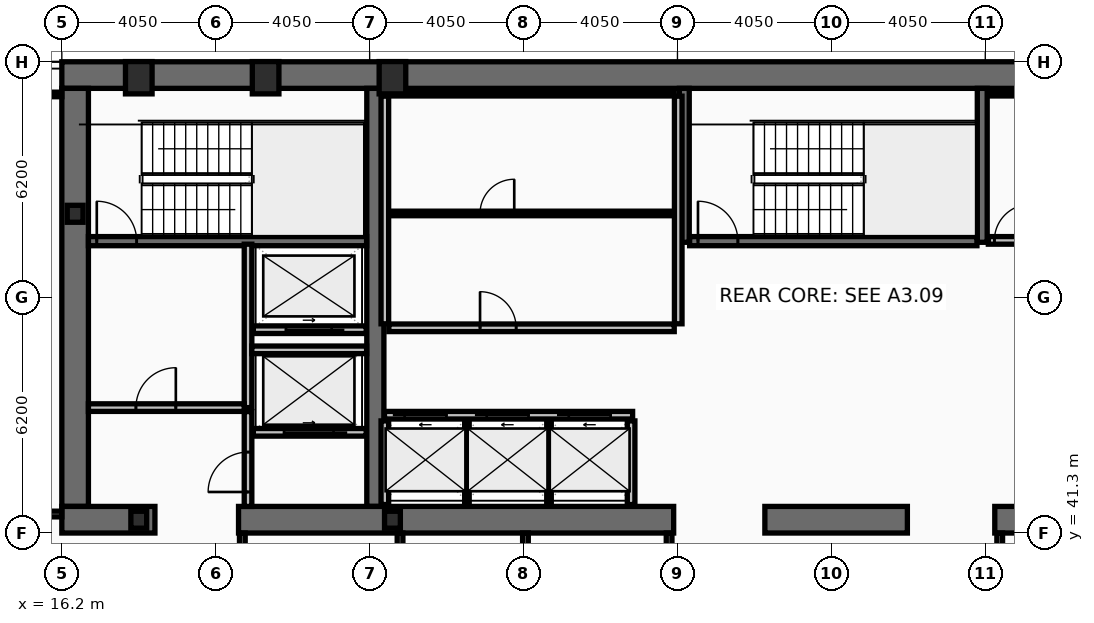
"""IFC4 building model, lengths in metres.
Left out: names, types, materials, properties, quantities, classifications, styles, units other than length and angle.
Written with IfcOpenShell. Run it as: python <this file> out.ifc"""

import sys

from ifc_helpers import new_model, si_unit, direction, frame, frame_2d, origin, origin_2d, place, context, subcontext, project, spatial, rectangle, hollow_rectangle, i_section, extrude, element, fill, save


model = new_model("IFC4")
c1 = context("Model", 3, precision=1e-05, world=origin(), true_north=direction((0.0, 1.0)))
c2 = subcontext(c1, "Body", "Model", "MODEL_VIEW")
j1 = project(units=[si_unit("LENGTHUNIT", "METRE"), si_unit("PLANEANGLEUNIT", "RADIAN")], contexts=[c1])
p1 = place(None, origin())
s1 = spatial("IfcSite", under=j1, at=p1, CompositionType="ELEMENT")
p2 = place(p1, origin())
s2 = spatial("IfcBuilding", under=s1, at=p2, CompositionType="ELEMENT")
p3 = place(p2, frame((0.0, 0.0, 168.6)))
s3 = spatial("IfcBuildingStorey", under=s2, at=p3, CompositionType="ELEMENT", Elevation=168.6)
p4 = place(p3, frame((16.2, 53.35, 0.0), z_axis=(0.0, 0.0, 1.0), x_axis=(1.0, 0.0, 0.0)))
e1 = element("IfcWall", 1, at=p4, inside=s3, PredefinedType="SHEAR", context=c2, shape_type="SweptSolid", body=[
    extrude(rectangle(XDim=40.5, YDim=0.7, at=frame_2d((20.25, 0.0))), origin(), (0.0, 0.0, 1.0), 3.38),
])
p5 = place(p3, frame((16.55, 42.0, 0.0), z_axis=(0.0, 0.0, 1.0), x_axis=(0.0, 1.0, 0.0)))
e2 = element("IfcWall", 2, at=p5, inside=s3, PredefinedType="SHEAR", context=c2, shape_type="SweptSolid", body=[
    extrude(rectangle(XDim=11.0, YDim=0.7, at=frame_2d((5.5, 0.0))), origin(), (0.0, 0.0, 1.0), 3.38),
])
p6 = place(p3, frame((24.45, 42.0, 0.0), z_axis=(0.0, 0.0, 1.0), x_axis=(0.0, 1.0, 0.0)))
e3 = element("IfcWall", 3, at=p6, inside=s3, PredefinedType="SHEAR", context=c2, shape_type="SweptSolid", body=[
    extrude(rectangle(XDim=11.0, YDim=0.45, at=frame_2d((5.5, 0.0))), origin(), (0.0, 0.0, 1.0), 3.38),
])
p7 = place(p3, frame((18.65, 41.65, 0.0), z_axis=(0.0, 0.0, 1.0), x_axis=(-1.0, 0.0, 0.0)))
e4 = element("IfcWall", 4, at=p7, inside=s3, PredefinedType="SHEAR", context=c2, shape_type="SweptSolid", body=[
    extrude(rectangle(XDim=2.45, YDim=0.7, at=frame_2d((1.225, 0.0))), origin(), (0.0, 0.0, 1.0), 3.38),
])
p8 = place(p3, frame((32.3, 41.65, 0.0), z_axis=(0.0, 0.0, 1.0), x_axis=(-1.0, 0.0, 0.0)))
e5 = element("IfcWall", 5, at=p8, inside=s3, PredefinedType="SHEAR", context=c2, shape_type="SweptSolid", body=[
    extrude(rectangle(XDim=11.45, YDim=0.7, at=frame_2d((5.725, 0.0))), origin(), (0.0, 0.0, 1.0), 3.38),
])
p9 = place(p3, frame((38.45, 41.65, 0.0), z_axis=(0.0, 0.0, 1.0), x_axis=(-1.0, 0.0, 0.0)))
e6 = element("IfcWall", 6, at=p9, inside=s3, PredefinedType="SHEAR", context=c2, shape_type="SweptSolid", body=[
    extrude(rectangle(XDim=3.75, YDim=0.7, at=frame_2d((1.875, 0.0))), origin(), (0.0, 0.0, 1.0), 3.38),
])
p10 = place(p3, frame((52.05, 41.65, 0.0), z_axis=(0.0, 0.0, 1.0), x_axis=(-1.0, 0.0, 0.0)))
e7 = element("IfcWall", 7, at=p10, inside=s3, PredefinedType="SHEAR", context=c2, shape_type="SweptSolid", body=[
    extrude(rectangle(XDim=11.3, YDim=0.7, at=frame_2d((5.65, 0.0))), origin(), (0.0, 0.0, 1.0), 3.38),
])
for number, where, z_axis, x_axis in (
    (8, (32.58, 48.95, 0.0), (0.0, 0.0, 1.0), (0.0, 1.0, 0.0)),
    (9, (40.42, 48.95, 0.0), (0.0, 0.0, 1.0), (0.0, 1.0, 0.0)),
):
    element("IfcWall", number, at=place(p3, frame(where, z_axis=z_axis, x_axis=x_axis)), inside=s3, PredefinedType="SHEAR", context=c2, shape_type="SweptSolid", body=[
        extrude(rectangle(XDim=4.05, YDim=0.26, at=frame_2d((2.025, 0.0))), origin(), (0.0, 0.0, 1.0), 3.38),
    ])
p11 = place(p3, frame((16.9, 48.98, 0.0), z_axis=(0.0, 0.0, 1.0), x_axis=(1.0, 0.0, 0.0)))
e10 = element("IfcWall", 10, at=p11, inside=s3, PredefinedType="SHEAR", context=c2, shape_type="SweptSolid", body=[
    extrude(rectangle(XDim=7.32, YDim=0.24, at=frame_2d((3.66, 0.0))), origin(), (0.0, 0.0, 1.0), 3.38),
])
p12 = place(p11, frame((0.22, 0.0, 0.0)))
e11 = element("IfcOpeningElement", 11, at=p12, cuts=e10, PredefinedType="OPENING", context=c2, shape_type="SweptSolid", body=[
    extrude(rectangle(XDim=1.05, YDim=2.15, at=frame_2d((0.525, 1.075))), frame((0.0, 0.13, 0.0), z_axis=(0.0, -1.0, 0.0), x_axis=(1.0, 0.0, 0.0)), (0.0, 0.0, 1.0), 0.26),
])
p13 = place(p3, frame((32.72, 48.98, 0.0), z_axis=(0.0, 0.0, 1.0), x_axis=(1.0, 0.0, 0.0)))
e12 = element("IfcWall", 12, at=p13, inside=s3, PredefinedType="SHEAR", context=c2, shape_type="SweptSolid", body=[
    extrude(rectangle(XDim=7.56, YDim=0.24, at=frame_2d((3.78, 0.0))), origin(), (0.0, 0.0, 1.0), 3.38),
])
p14 = place(p13, frame((0.22, 0.0, 0.0)))
e13 = element("IfcOpeningElement", 13, at=p14, cuts=e12, PredefinedType="OPENING", context=c2, shape_type="SweptSolid", body=[
    extrude(rectangle(XDim=1.05, YDim=2.15, at=frame_2d((0.525, 1.075))), frame((0.0, 0.13, 0.0), z_axis=(0.0, -1.0, 0.0), x_axis=(1.0, 0.0, 0.0)), (0.0, 0.0, 1.0), 0.26),
])
for number, where, z_axis, x_axis in (
    (14, (18.225, 53.28, 0.0), (0.0, 0.0, 1.0), (1.0, 0.0, 0.0)),
    (15, (21.562, 53.28, 0.0), (0.0, 0.0, 1.0), (1.0, 0.0, 0.0)),
    (16, (24.9, 53.28, 0.0), (0.0, 0.0, 1.0), (1.0, 0.0, 0.0)),
):
    element("IfcColumn", number, at=place(p3, frame(where, z_axis=z_axis, x_axis=x_axis)), inside=s3, PredefinedType="COLUMN", context=c2, shape_type="SweptSolid", body=[
        extrude(hollow_rectangle(XDim=0.7, YDim=0.85, WallThickness=0.05, at=origin_2d()), origin(), (0.0, 0.0, 1.0), 3.6),
    ])
for number, where, z_axis, x_axis in (
    (17, (16.55, 49.7, 0.0), (0.0, 0.0, 1.0), (1.0, 0.0, 0.0)),
    (18, (18.225, 41.65, 0.0), (0.0, 0.0, 1.0), (1.0, 0.0, 0.0)),
    (19, (24.9, 41.65, 0.0), (0.0, 0.0, 1.0), (1.0, 0.0, 0.0)),
):
    element("IfcColumn", number, at=place(p3, frame(where, z_axis=z_axis, x_axis=x_axis)), inside=s3, PredefinedType="COLUMN", context=c2, shape_type="SweptSolid", body=[
        extrude(i_section(OverallWidth=0.416, OverallDepth=0.446, WebThickness=0.039, FlangeThickness=0.063, at=origin_2d()), origin(), (0.0, 0.0, 1.0), 3.6),
    ])
p15 = place(p3, frame((24.69, 44.4, 0.0), z_axis=(0.0, 0.0, 1.0), x_axis=(1.0, 0.0, 0.0)))
e20 = element("IfcWall", 20, at=p15, inside=s3, PredefinedType="PARTITIONING", context=c2, shape_type="SweptSolid", body=[
    extrude(rectangle(XDim=6.53, YDim=0.2, at=frame_2d((3.265, 0.0))), origin(), (0.0, 0.0, 1.0), 3.38),
])
p16 = place(p15, frame((0.53, 0.0, 0.0)))
e21 = element("IfcOpeningElement", 21, at=p16, cuts=e20, PredefinedType="OPENING", context=c2, shape_type="SweptSolid", body=[
    extrude(rectangle(XDim=1.1, YDim=2.18, at=frame_2d((0.55, 1.09))), frame((0.0, 0.11, 0.0), z_axis=(0.0, -1.0, 0.0), x_axis=(1.0, 0.0, 0.0)), (0.0, 0.0, 1.0), 0.22),
])
p17 = place(p15, frame((2.69, 0.0, 0.0)))
e22 = element("IfcOpeningElement", 22, at=p17, cuts=e20, PredefinedType="OPENING", context=c2, shape_type="SweptSolid", body=[
    extrude(rectangle(XDim=1.1, YDim=2.18, at=frame_2d((0.55, 1.09))), frame((0.0, 0.11, 0.0), z_axis=(0.0, -1.0, 0.0), x_axis=(1.0, 0.0, 0.0)), (0.0, 0.0, 1.0), 0.22),
])
p18 = place(p15, frame((4.85, 0.0, 0.0)))
e23 = element("IfcOpeningElement", 23, at=p18, cuts=e20, PredefinedType="OPENING", context=c2, shape_type="SweptSolid", body=[
    extrude(rectangle(XDim=1.1, YDim=2.18, at=frame_2d((0.55, 1.09))), frame((0.0, 0.11, 0.0), z_axis=(0.0, -1.0, 0.0), x_axis=(1.0, 0.0, 0.0)), (0.0, 0.0, 1.0), 0.22),
])
p19 = place(p3, frame((24.21, 43.95, 0.0), z_axis=(0.0, 0.0, 1.0), x_axis=(-1.0, 0.0, 0.0)))
e24 = element("IfcWall", 24, at=p19, inside=s3, PredefinedType="PARTITIONING", context=c2, shape_type="SweptSolid", body=[
    extrude(rectangle(XDim=2.97, YDim=0.2, at=frame_2d((1.485, 0.0))), origin(), (0.0, 0.0, 1.0), 3.38),
])
p20 = place(p19, frame((0.86, 0.0, 0.0)))
e25 = element("IfcOpeningElement", 25, at=p20, cuts=e24, PredefinedType="OPENING", context=c2, shape_type="SweptSolid", body=[
    extrude(rectangle(XDim=1.3, YDim=2.18, at=frame_2d((0.65, 1.09))), frame((0.0, 0.11, 0.0), z_axis=(0.0, -1.0, 0.0), x_axis=(1.0, 0.0, 0.0)), (0.0, 0.0, 1.0), 0.22),
])
p21 = place(p3, frame((24.21, 46.65, 0.0), z_axis=(0.0, 0.0, 1.0), x_axis=(-1.0, 0.0, 0.0)))
e26 = element("IfcWall", 26, at=p21, inside=s3, PredefinedType="PARTITIONING", context=c2, shape_type="SweptSolid", body=[
    extrude(rectangle(XDim=2.97, YDim=0.2, at=frame_2d((1.485, 0.0))), origin(), (0.0, 0.0, 1.0), 3.38),
])
p22 = place(p21, frame((0.91, 0.0, 0.0)))
e27 = element("IfcOpeningElement", 27, at=p22, cuts=e26, PredefinedType="OPENING", context=c2, shape_type="SweptSolid", body=[
    extrude(rectangle(XDim=1.2, YDim=2.18, at=frame_2d((0.6, 1.09))), frame((0.0, 0.11, 0.0), z_axis=(0.0, -1.0, 0.0), x_axis=(1.0, 0.0, 0.0)), (0.0, 0.0, 1.0), 0.22),
])
p23 = place(p3, frame((21.1, 44.6, 0.0), z_axis=(0.0, 0.0, 1.0), x_axis=(0.0, 1.0, 0.0)))
e28 = element("IfcWall", 28, at=p23, inside=s3, PredefinedType="PARTITIONING", context=c2, shape_type="SweptSolid", body=[
    extrude(rectangle(XDim=4.3, YDim=0.2, at=frame_2d((2.15, 0.0))), origin(), (0.0, 0.0, 1.0), 3.38),
])
p24 = place(p3, frame((16.9, 44.6, 0.0), z_axis=(0.0, 0.0, 1.0), x_axis=(1.0, 0.0, 0.0)))
e29 = element("IfcWall", 29, at=p24, inside=s3, PredefinedType="PARTITIONING", context=c2, shape_type="SweptSolid", body=[
    extrude(rectangle(XDim=4.1, YDim=0.2, at=frame_2d((2.05, 0.0))), origin(), (0.0, 0.0, 1.0), 3.38),
])
p25 = place(p24, frame((1.25, 0.0, 0.0)))
e30 = element("IfcOpeningElement", 30, at=p25, cuts=e29, PredefinedType="OPENING", context=c2, shape_type="SweptSolid", body=[
    extrude(rectangle(XDim=1.05, YDim=2.15, at=frame_2d((0.525, 1.075))), frame((0.0, 0.11, 0.0), z_axis=(0.0, -1.0, 0.0), x_axis=(1.0, 0.0, 0.0)), (0.0, 0.0, 1.0), 0.22),
])
p26 = place(p3, frame((21.2, 46.12, 0.0), z_axis=(0.0, 0.0, 1.0), x_axis=(1.0, 0.0, 0.0)))
e31 = element("IfcWall", 31, at=p26, inside=s3, PredefinedType="PARTITIONING", context=c2, shape_type="SweptSolid", body=[
    extrude(rectangle(XDim=3.02, YDim=0.2, at=frame_2d((1.51, 0.0))), origin(), (0.0, 0.0, 1.0), 3.38),
])
p27 = place(p3, frame((21.1, 42.0, 0.0), z_axis=(0.0, 0.0, 1.0), x_axis=(0.0, 1.0, 0.0)))
e32 = element("IfcWall", 32, at=p27, inside=s3, PredefinedType="PARTITIONING", context=c2, shape_type="SweptSolid", body=[
    extrude(rectangle(XDim=2.495, YDim=0.2, at=frame_2d((1.248, 0.0))), origin(), (0.0, 0.0, 1.0), 3.38),
])
p28 = place(p27, frame((0.38, 0.0, 0.0)))
e33 = element("IfcOpeningElement", 33, at=p28, cuts=e32, PredefinedType="OPENING", context=c2, shape_type="SweptSolid", body=[
    extrude(rectangle(XDim=1.05, YDim=2.15, at=frame_2d((0.525, 1.075))), frame((0.0, 0.11, 0.0), z_axis=(0.0, -1.0, 0.0), x_axis=(1.0, 0.0, 0.0)), (0.0, 0.0, 1.0), 0.22),
])
for number, where, z_axis, x_axis in (
    (34, (24.7, 46.805, 0.0), (0.0, 0.0, 1.0), (0.0, 1.0, 0.0)),
    (35, (32.42, 46.805, 0.0), (0.0, 0.0, 1.0), (0.0, 1.0, 0.0)),
):
    element("IfcWall", number, at=place(p3, frame(where, z_axis=z_axis, x_axis=x_axis)), inside=s3, PredefinedType="PARTITIONING", context=c2, shape_type="SweptSolid", body=[
        extrude(rectangle(XDim=5.99, YDim=0.2, at=frame_2d((2.995, 0.0))), origin(), (0.0, 0.0, 1.0), 3.38),
    ])
p29 = place(p3, frame((24.805, 52.86, 0.0), z_axis=(0.0, 0.0, 1.0), x_axis=(1.0, 0.0, 0.0)))
e36 = element("IfcWall", 36, at=p29, inside=s3, PredefinedType="PARTITIONING", context=c2, shape_type="SweptSolid", body=[
    extrude(rectangle(XDim=7.51, YDim=0.12, at=frame_2d((3.755, 0.0))), origin(), (0.0, 0.0, 1.0), 3.38),
])
p30 = place(p3, frame((24.805, 49.709, 0.0), z_axis=(0.0, 0.0, 1.0), x_axis=(1.0, 0.0, 0.0)))
e37 = element("IfcWall", 37, at=p30, inside=s3, PredefinedType="PARTITIONING", context=c2, shape_type="SweptSolid", body=[
    extrude(rectangle(XDim=7.51, YDim=0.12, at=frame_2d((3.755, 0.0))), origin(), (0.0, 0.0, 1.0), 3.38),
])
p31 = place(p30, frame((2.4, 0.0, 0.0)))
e38 = element("IfcOpeningElement", 38, at=p31, cuts=e37, PredefinedType="OPENING", context=c2, shape_type="SweptSolid", body=[
    extrude(rectangle(XDim=0.9, YDim=2.05, at=frame_2d((0.45, 1.025))), frame((0.0, 0.07, 0.0), z_axis=(0.0, -1.0, 0.0), x_axis=(1.0, 0.0, 0.0)), (0.0, 0.0, 1.0), 0.14),
])
p32 = place(p3, frame((24.805, 46.7, 0.0), z_axis=(0.0, 0.0, 1.0), x_axis=(1.0, 0.0, 0.0)))
e39 = element("IfcWall", 39, at=p32, inside=s3, PredefinedType="PARTITIONING", context=c2, shape_type="SweptSolid", body=[
    extrude(rectangle(XDim=7.51, YDim=0.2, at=frame_2d((3.755, 0.0))), origin(), (0.0, 0.0, 1.0), 3.38),
])
p33 = place(p32, frame((2.4, 0.0, 0.0)))
e40 = element("IfcOpeningElement", 40, at=p33, cuts=e39, PredefinedType="OPENING", context=c2, shape_type="SweptSolid", body=[
    extrude(rectangle(XDim=0.95, YDim=2.1, at=frame_2d((0.475, 1.05))), frame((0.0, 0.11, 0.0), z_axis=(0.0, -1.0, 0.0), x_axis=(1.0, 0.0, 0.0)), (0.0, 0.0, 1.0), 0.22),
])
for number, where, z_axis, x_axis in (
    (41, (24.7, 42.05, 0.0), (0.0, 0.0, 1.0), (0.0, 1.0, 0.0)),
    (42, (31.18, 42.05, 0.0), (0.0, 0.0, 1.0), (0.0, 1.0, 0.0)),
):
    element("IfcWall", number, at=place(p3, frame(where, z_axis=z_axis, x_axis=x_axis)), inside=s3, PredefinedType="PARTITIONING", context=c2, shape_type="SweptSolid", body=[
        extrude(rectangle(XDim=2.2, YDim=0.2, at=frame_2d((1.1, 0.0))), origin(), (0.0, 0.0, 1.0), 3.38),
    ])
for number, where, z_axis, x_axis in (
    (43, (26.86, 42.05, 0.0), (0.0, 0.0, 1.0), (0.0, 1.0, 0.0)),
    (44, (29.02, 42.05, 0.0), (0.0, 0.0, 1.0), (0.0, 1.0, 0.0)),
):
    element("IfcWall", number, at=place(p3, frame(where, z_axis=z_axis, x_axis=x_axis)), inside=s3, PredefinedType="PARTITIONING", context=c2, shape_type="SweptSolid", body=[
        extrude(rectangle(XDim=2.2, YDim=0.12, at=frame_2d((1.1, 0.0))), origin(), (0.0, 0.0, 1.0), 3.38),
    ])
p34 = place(p3, frame((40.58, 52.86, 0.0), z_axis=(0.0, 0.0, 1.0), x_axis=(1.0, 0.0, 0.0)))
e45 = element("IfcWall", 45, at=p34, inside=s3, PredefinedType="PARTITIONING", context=c2, shape_type="SweptSolid", body=[
    extrude(rectangle(XDim=7.56, YDim=0.12, at=frame_2d((3.78, 0.0))), origin(), (0.0, 0.0, 1.0), 3.38),
])
p35 = place(p3, frame((40.58, 49.0, 0.0), z_axis=(0.0, 0.0, 1.0), x_axis=(1.0, 0.0, 0.0)))
e46 = element("IfcWall", 46, at=p35, inside=s3, PredefinedType="PARTITIONING", context=c2, shape_type="SweptSolid", body=[
    extrude(rectangle(XDim=7.56, YDim=0.2, at=frame_2d((3.78, 0.0))), origin(), (0.0, 0.0, 1.0), 3.38),
])
p36 = place(p35, frame((0.16, 0.0, 0.0)))
e47 = element("IfcOpeningElement", 47, at=p36, cuts=e46, PredefinedType="OPENING", context=c2, shape_type="SweptSolid", body=[
    extrude(rectangle(XDim=0.95, YDim=2.1, at=frame_2d((0.475, 1.05))), frame((0.0, 0.11, 0.0), z_axis=(0.0, -1.0, 0.0), x_axis=(1.0, 0.0, 0.0)), (0.0, 0.0, 1.0), 0.22),
])
p37 = place(p3, frame((20.95, 38.28, 0.0), z_axis=(0.0, 0.0, 1.0), x_axis=(0.0, 1.0, 0.0)))
e48 = element("IfcWall", 48, at=p37, inside=s3, PredefinedType="PARTITIONING", context=c2, shape_type="SweptSolid", body=[
    extrude(rectangle(XDim=3.02, YDim=0.15, at=frame_2d((1.51, 0.0))), origin(), (0.0, 0.0, 1.0), 3.38),
])
p38 = place(p3, frame((25.1, 38.28, 0.0), z_axis=(0.0, 0.0, 1.0), x_axis=(0.0, 1.0, 0.0)))
e49 = element("IfcWall", 49, at=p38, inside=s3, PredefinedType="PARTITIONING", context=c2, shape_type="SweptSolid", body=[
    extrude(rectangle(XDim=3.02, YDim=0.15, at=frame_2d((1.51, 0.0))), origin(), (0.0, 0.0, 1.0), 2.67),
])
for number, where, z_axis, x_axis in (
    (50, (28.4, 38.28, 0.0), (0.0, 0.0, 1.0), (0.0, 1.0, 0.0)),
    (51, (32.18, 38.28, 0.0), (0.0, 0.0, 1.0), (0.0, 1.0, 0.0)),
    (52, (40.88, 38.28, 0.0), (0.0, 0.0, 1.0), (0.0, 1.0, 0.0)),
):
    element("IfcWall", number, at=place(p3, frame(where, z_axis=z_axis, x_axis=x_axis)), inside=s3, PredefinedType="PARTITIONING", context=c2, shape_type="SweptSolid", body=[
        extrude(rectangle(XDim=3.02, YDim=0.15, at=frame_2d((1.51, 0.0))), origin(), (0.0, 0.0, 1.0), 3.38),
    ])
p39 = place(p3, frame((6.095, 41.8, 0.0), z_axis=(0.0, 0.0, 1.0), x_axis=(1.0, 0.0, 0.0)))
e53 = element("IfcWall", 53, at=p39, inside=s3, PredefinedType="PARTITIONING", context=c2, shape_type="SweptSolid", body=[
    extrude(rectangle(XDim=10.105, YDim=0.15, at=frame_2d((5.052, 0.0))), origin(), (0.0, 0.0, 1.0), 3.38),
])
p40 = place(p39, frame((8.32, 0.0, 0.0)))
e54 = element("IfcOpeningElement", 54, at=p40, cuts=e53, PredefinedType="OPENING", context=c2, shape_type="SweptSolid", body=[
    extrude(rectangle(XDim=0.9, YDim=2.05, at=frame_2d((0.45, 1.025))), frame((0.0, 0.085, 0.0), z_axis=(0.0, -1.0, 0.0), x_axis=(1.0, 0.0, 0.0)), (0.0, 0.0, 1.0), 0.17),
])
p41 = place(p3, frame((6.095, 52.84, 0.0), z_axis=(0.0, 0.0, 1.0), x_axis=(1.0, 0.0, 0.0)))
e55 = element("IfcWall", 55, at=p41, inside=s3, PredefinedType="PARTITIONING", context=c2, shape_type="SweptSolid", body=[
    extrude(rectangle(XDim=10.105, YDim=0.12, at=frame_2d((5.052, 0.0))), origin(), (0.0, 0.0, 1.0), 3.38),
])
p42 = place(p12, origin())
e56 = element("IfcDoor", 56, at=p42, inside=s3, OperationType="SINGLE_SWING_LEFT", PredefinedType="DOOR", context=c2, shape_type="SweptSolid", body=[
    extrude(rectangle(XDim=1.05, YDim=2.15, at=frame_2d((0.525, 1.075))), frame((0.0, 0.025, 0.0), z_axis=(0.0, -1.0, 0.0), x_axis=(1.0, 0.0, 0.0)), (0.0, 0.0, 1.0), 0.05),
])
fill(e11, e56)
p43 = place(p14, origin())
e57 = element("IfcDoor", 57, at=p43, inside=s3, OperationType="SINGLE_SWING_LEFT", PredefinedType="DOOR", context=c2, shape_type="SweptSolid", body=[
    extrude(rectangle(XDim=1.05, YDim=2.15, at=frame_2d((0.525, 1.075))), frame((0.0, 0.025, 0.0), z_axis=(0.0, -1.0, 0.0), x_axis=(1.0, 0.0, 0.0)), (0.0, 0.0, 1.0), 0.05),
])
fill(e13, e57)
p44 = place(p16, origin())
e58 = element("IfcDoor", 58, at=p44, inside=s3, OperationType="SLIDING_TO_LEFT", PredefinedType="DOOR", context=c2, shape_type="SweptSolid", body=[
    extrude(rectangle(XDim=1.1, YDim=2.18, at=frame_2d((0.55, 1.09))), frame((0.0, 0.025, 0.0), z_axis=(0.0, -1.0, 0.0), x_axis=(1.0, 0.0, 0.0)), (0.0, 0.0, 1.0), 0.05),
])
fill(e21, e58)
p45 = place(p17, origin())
e59 = element("IfcDoor", 59, at=p45, inside=s3, OperationType="SLIDING_TO_LEFT", PredefinedType="DOOR", context=c2, shape_type="SweptSolid", body=[
    extrude(rectangle(XDim=1.1, YDim=2.18, at=frame_2d((0.55, 1.09))), frame((0.0, 0.025, 0.0), z_axis=(0.0, -1.0, 0.0), x_axis=(1.0, 0.0, 0.0)), (0.0, 0.0, 1.0), 0.05),
])
fill(e22, e59)
p46 = place(p18, origin())
e60 = element("IfcDoor", 60, at=p46, inside=s3, OperationType="SLIDING_TO_LEFT", PredefinedType="DOOR", context=c2, shape_type="SweptSolid", body=[
    extrude(rectangle(XDim=1.1, YDim=2.18, at=frame_2d((0.55, 1.09))), frame((0.0, 0.025, 0.0), z_axis=(0.0, -1.0, 0.0), x_axis=(1.0, 0.0, 0.0)), (0.0, 0.0, 1.0), 0.05),
])
fill(e23, e60)
p47 = place(p20, origin())
e61 = element("IfcDoor", 61, at=p47, inside=s3, OperationType="SLIDING_TO_LEFT", PredefinedType="DOOR", context=c2, shape_type="SweptSolid", body=[
    extrude(rectangle(XDim=1.3, YDim=2.18, at=frame_2d((0.65, 1.09))), frame((0.0, 0.025, 0.0), z_axis=(0.0, -1.0, 0.0), x_axis=(1.0, 0.0, 0.0)), (0.0, 0.0, 1.0), 0.05),
])
fill(e25, e61)
p48 = place(p22, origin())
e62 = element("IfcDoor", 62, at=p48, inside=s3, OperationType="SLIDING_TO_LEFT", PredefinedType="DOOR", context=c2, shape_type="SweptSolid", body=[
    extrude(rectangle(XDim=1.2, YDim=2.18, at=frame_2d((0.6, 1.09))), frame((0.0, 0.025, 0.0), z_axis=(0.0, -1.0, 0.0), x_axis=(1.0, 0.0, 0.0)), (0.0, 0.0, 1.0), 0.05),
])
fill(e27, e62)
p49 = place(p25, origin())
e63 = element("IfcDoor", 63, at=p49, inside=s3, OperationType="SINGLE_SWING_RIGHT", PredefinedType="DOOR", context=c2, shape_type="SweptSolid", body=[
    extrude(rectangle(XDim=1.05, YDim=2.15, at=frame_2d((0.525, 1.075))), frame((0.0, 0.025, 0.0), z_axis=(0.0, -1.0, 0.0), x_axis=(1.0, 0.0, 0.0)), (0.0, 0.0, 1.0), 0.05),
])
fill(e30, e63)
p50 = place(p28, origin())
e64 = element("IfcDoor", 64, at=p50, inside=s3, OperationType="SINGLE_SWING_LEFT", PredefinedType="DOOR", context=c2, shape_type="SweptSolid", body=[
    extrude(rectangle(XDim=1.05, YDim=2.15, at=frame_2d((0.525, 1.075))), frame((0.0, 0.025, 0.0), z_axis=(0.0, -1.0, 0.0), x_axis=(1.0, 0.0, 0.0)), (0.0, 0.0, 1.0), 0.05),
])
fill(e33, e64)
p51 = place(p31, origin())
e65 = element("IfcDoor", 65, at=p51, inside=s3, OperationType="SINGLE_SWING_RIGHT", PredefinedType="DOOR", context=c2, shape_type="SweptSolid", body=[
    extrude(rectangle(XDim=0.9, YDim=2.05, at=frame_2d((0.45, 1.025))), frame((0.0, 0.025, 0.0), z_axis=(0.0, -1.0, 0.0), x_axis=(1.0, 0.0, 0.0)), (0.0, 0.0, 1.0), 0.05),
])
fill(e38, e65)
p52 = place(p33, origin())
e66 = element("IfcDoor", 66, at=p52, inside=s3, OperationType="SINGLE_SWING_LEFT", PredefinedType="DOOR", context=c2, shape_type="SweptSolid", body=[
    extrude(rectangle(XDim=0.95, YDim=2.1, at=frame_2d((0.475, 1.05))), frame((0.0, 0.025, 0.0), z_axis=(0.0, -1.0, 0.0), x_axis=(1.0, 0.0, 0.0)), (0.0, 0.0, 1.0), 0.05),
])
fill(e40, e66)
p53 = place(p36, origin())
e67 = element("IfcDoor", 67, at=p53, inside=s3, OperationType="SINGLE_SWING_RIGHT", PredefinedType="DOOR", context=c2, shape_type="SweptSolid", body=[
    extrude(rectangle(XDim=0.95, YDim=2.1, at=frame_2d((0.475, 1.05))), frame((0.0, 0.025, 0.0), z_axis=(0.0, -1.0, 0.0), x_axis=(1.0, 0.0, 0.0)), (0.0, 0.0, 1.0), 0.05),
])
fill(e47, e67)
save(model, sys.argv[1])
